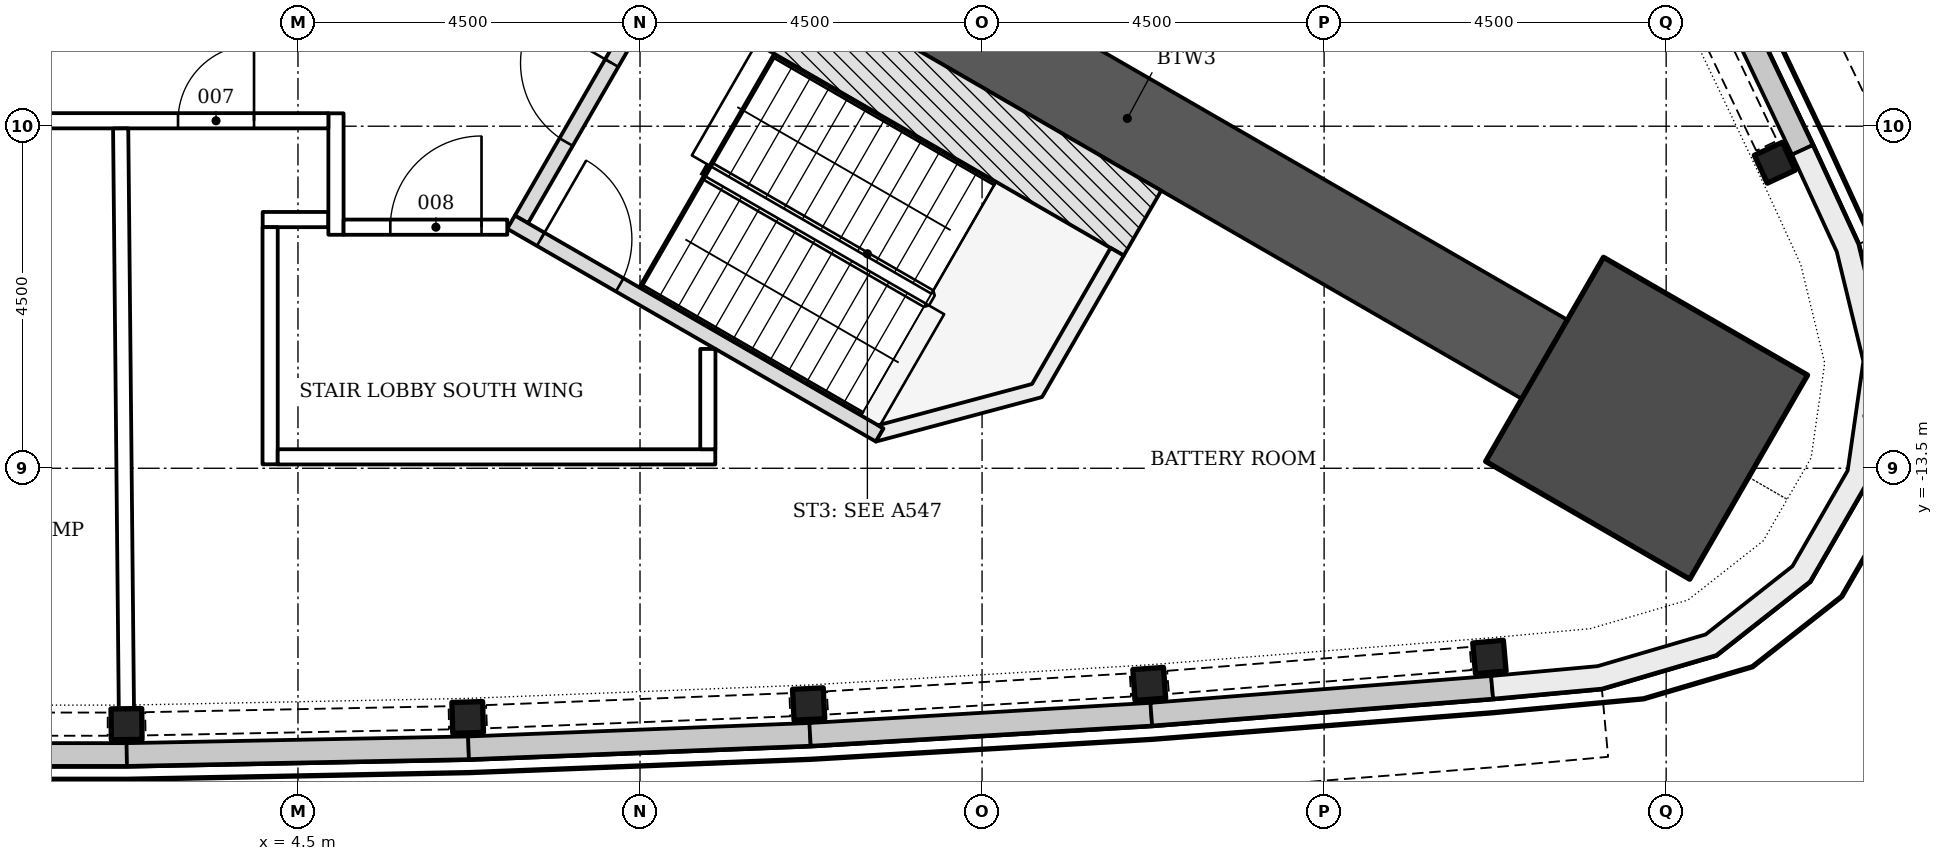
"""IFC4 building model, lengths in metres.
Left out: names, types, materials, properties, quantities, classifications, styles, units other than length and angle.
Written with IfcOpenShell. Run it as: python <this file> out.ifc"""

import sys

from ifc_helpers import new_model, si_unit, direction, frame, frame_2d, origin, origin_2d, place, context, subcontext, project, spatial, polyline, rectangle, i_section, outline, extrude, element, fill, save


model = new_model("IFC4")
c1 = context("Model", 3, precision=1e-05, world=origin(), true_north=direction((0.0, 1.0)))
c2 = subcontext(c1, "Body", "Model", "MODEL_VIEW")
j1 = project(units=[si_unit("LENGTHUNIT", "METRE"), si_unit("PLANEANGLEUNIT", "RADIAN")], contexts=[c1])
p1 = place(None, origin())
s1 = spatial("IfcSite", under=j1, at=p1, CompositionType="ELEMENT")
p2 = place(p1, origin())
s2 = spatial("IfcBuilding", under=s1, at=p2, CompositionType="ELEMENT")
p3 = place(p2, frame((0.0, 0.0, 87.0)))
s3 = spatial("IfcBuildingStorey", under=s2, at=p3, CompositionType="ELEMENT", Elevation=87.0)
p4 = place(p3, frame((9.922, -5.728, -0.3), z_axis=(0.0, 0.0, 1.0), x_axis=(0.866029086277, -0.499993621681, 0.0)))
e1 = element("IfcWall", 1, at=p4, inside=s3, PredefinedType="SHEAR", context=c2, shape_type="SweptSolid", body=[
    extrude(rectangle(XDim=12.677, YDim=1.2, at=frame_2d((6.339, 0.0))), origin(), (0.0, 0.0, 1.0), 4.6),
])
p5 = place(p3, frame((22.243, -12.842, -0.3), z_axis=(0.0, 0.0, 1.0), x_axis=(0.866025403784, -0.5, 0.0)))
e2 = element("IfcColumn", 2, at=p5, inside=s3, PredefinedType="COLUMN", context=c2, shape_type="SweptSolid", body=[
    extrude(rectangle(XDim=3.1, YDim=3.1, at=origin_2d()), origin(), (0.0, 0.0, 1.0), 4.6),
])
for number, where, z_axis, x_axis in (
    (3, (2.245, -16.866, -0.3), (0.0, 0.0, 1.0), (1.0, 0.01, 0.0)),
    (4, (6.733, -16.778, -0.3), (0.0, 0.0, 1.0), (1.0, 0.03, 0.0)),
    (5, (11.219, -16.601, -0.3), (0.0, 0.0, 1.0), (0.999, 0.049, 0.0)),
    (6, (15.7, -16.336, -0.3), (0.0, 0.0, 1.0), (0.998, 0.069, 0.0)),
    (7, (20.175, -15.983, -0.3), (0.0, 0.0, 1.0), (0.996, 0.088, 0.0)),
    (8, (23.929, -9.48, -0.3), (0.0, 0.0, 1.0), (-0.421, 0.907, 0.0)),
):
    element("IfcColumn", number, at=place(p3, frame(where, z_axis=z_axis, x_axis=x_axis)), inside=s3, PredefinedType="COLUMN", context=c2, shape_type="SweptSolid", body=[
        extrude(i_section(OverallWidth=0.404, OverallDepth=0.406, WebThickness=0.027, FlangeThickness=0.044, FilletRadius=0.015, at=origin_2d()), origin(), (0.0, 0.0, 1.0), 4.6),
    ])
p6 = place(p3, origin())
e9 = element("IfcWall", 9, at=p6, inside=s3, PredefinedType="NOTDEFINED", context=c2, shape_type="SweptSolid", body=[
    extrude(outline(polyline([(-2.25, -17.417), (2.25, -17.417), (2.25, -17.116), (-2.25, -17.116), (-2.25, -17.417)])), origin(), (0.0, 0.0, 1.0), 1.2),
])
p7 = place(p3, origin())
e10 = element("IfcWall", 10, at=p7, inside=s3, PredefinedType="NOTDEFINED", context=c2, shape_type="SweptSolid", body=[
    extrude(outline(polyline([(2.25, -17.417), (6.749, -17.328), (6.743, -17.028), (2.244, -17.116), (2.25, -17.417)])), origin(), (0.0, 0.0, 1.0), 1.2),
])
p8 = place(p3, origin())
e11 = element("IfcWall", 11, at=p8, inside=s3, PredefinedType="NOTDEFINED", context=c2, shape_type="SweptSolid", body=[
    extrude(outline(polyline([(6.749, -17.328), (11.245, -17.151), (11.234, -16.851), (6.737, -17.028), (6.749, -17.328)])), origin(), (0.0, 0.0, 1.0), 1.2),
])
p9 = place(p3, origin())
e12 = element("IfcWall", 12, at=p9, inside=s3, PredefinedType="NOTDEFINED", context=c2, shape_type="SweptSolid", body=[
    extrude(outline(polyline([(11.245, -17.151), (15.738, -16.885), (15.72, -16.586), (11.228, -16.851), (11.245, -17.151)])), origin(), (0.0, 0.0, 1.0), 1.2),
])
p10 = place(p3, origin())
e13 = element("IfcWall", 13, at=p10, inside=s3, PredefinedType="NOTDEFINED", context=c2, shape_type="SweptSolid", body=[
    extrude(outline(polyline([(15.738, -16.885), (20.224, -16.531), (20.2, -16.232), (15.714, -16.586), (15.738, -16.885)])), origin(), (0.0, 0.0, 1.0), 1.2),
])
p11 = place(p3, origin())
e14 = element("IfcWall", 14, at=p11, inside=s3, PredefinedType="NOTDEFINED", context=c2, shape_type="SweptSolid", body=[
    extrude(outline(polyline([(24.428, -9.249), (22.492, -5.187), (22.221, -5.316), (24.157, -9.378), (24.428, -9.249)])), origin(), (0.0, 0.0, 1.0), 1.2),
])
p12 = place(p3, origin())
e15 = element("IfcWall", 15, at=p12, inside=s3, PredefinedType="NOTDEFINED", context=c2, shape_type="SweptSolid", body=[
    extrude(outline(polyline([(20.224, -16.531), (21.654, -16.4), (23.159, -15.958), (24.392, -14.989), (25.177, -13.63), (25.4, -12.077), (25.03, -10.553), (24.428, -9.249), (24.156, -9.374), (24.745, -10.652), (25.094, -12.092), (24.888, -13.53), (24.161, -14.789), (23.019, -15.687), (21.597, -16.104), (20.196, -16.232), (20.224, -16.531)])), origin(), (0.0, 0.0, 1.0), 4.3),
])
p13 = place(p3, frame((7.44, -10.226, -0.3), z_axis=(0.0, 0.0, 1.0), x_axis=(0.500022077904, 0.866012656725, 0.0)))
e16 = element("IfcWall", 16, at=p13, inside=s3, PredefinedType="SHEAR", context=c2, shape_type="SweptSolid", body=[
    extrude(rectangle(XDim=3.55, YDim=0.2, at=frame_2d((1.775, 0.0))), origin(), (0.0, 0.0, 1.0), 4.6),
])
p14 = place(p13, frame((1.175, 0.0, 0.3)))
e17 = element("IfcOpeningElement", 17, at=p14, cuts=e16, PredefinedType="OPENING", context=c2, shape_type="SweptSolid", body=[
    extrude(rectangle(XDim=1.2, YDim=2.1, at=frame_2d((0.6, 1.05))), frame((0.0, 0.11, 0.0), z_axis=(0.0, -1.0, 0.0), x_axis=(1.0, 0.0, 0.0)), (0.0, 0.0, 1.0), 0.22),
])
p15 = place(p3, frame((7.304, -10.262, -0.3), z_axis=(0.0, 0.0, 1.0), x_axis=(0.866026594901, -0.49999793692, 0.0)))
e18 = element("IfcWall", 18, at=p15, inside=s3, PredefinedType="SHEAR", context=c2, shape_type="SweptSolid", body=[
    extrude(rectangle(XDim=5.6, YDim=0.2, at=frame_2d((2.8, 0.0))), origin(), (0.0, 0.0, 1.0), 4.6),
])
p16 = place(p15, frame((0.45, 0.0, 0.3)))
e19 = element("IfcOpeningElement", 19, at=p16, cuts=e18, PredefinedType="OPENING", context=c2, shape_type="SweptSolid", body=[
    extrude(rectangle(XDim=1.2, YDim=2.1, at=frame_2d((0.6, 1.05))), frame((0.0, 0.11, 0.0), z_axis=(0.0, -1.0, 0.0), x_axis=(1.0, 0.0, 0.0)), (0.0, 0.0, 1.0), 0.22),
])
p17 = place(p3, frame((9.375, -6.675, -0.3), z_axis=(0.0, 0.0, 1.0), x_axis=(0.866026919366, -0.499997374926, 0.0)))
e20 = element("IfcWall", 20, at=p17, inside=s3, PredefinedType="SHEAR", context=c2, shape_type="SweptSolid", body=[
    extrude(rectangle(XDim=7.2, YDim=0.986, at=frame_2d((3.6, 0.0))), origin(), (0.0, 0.0, 1.0), 4.6),
])
p18 = place(p3, frame((0.0, 0.0, -0.3)))
e21 = element("IfcWall", 21, at=p18, inside=s3, PredefinedType="SHEAR", context=c2, shape_type="SweptSolid", body=[
    extrude(outline(polyline([(12.104, -13.149), (14.289, -12.563), (15.364, -10.701), (15.191, -10.601), (14.157, -12.392), (12.132, -12.934), (12.204, -12.976), (12.204, -12.976), (12.204, -12.976), (12.204, -12.976), (12.204, -12.976), (12.204, -12.976), (12.204, -12.976), (12.204, -12.976), (12.204, -12.976), (12.204, -12.976), (12.204, -12.976), (12.204, -12.976), (12.204, -12.976), (12.204, -12.976), (12.204, -12.976), (12.204, -12.976), (12.204, -12.976), (12.104, -13.149)])), origin(), (0.0, 0.0, 1.0), 4.6),
])
p19 = place(p3, frame((4.036, -10.228, 0.0), z_axis=(0.0, 0.0, 1.0), x_axis=(1.0, 0.0, 0.0)))
e22 = element("IfcWall", 22, at=p19, inside=s3, PredefinedType="PARTITIONING", context=c2, shape_type="SweptSolid", body=[
    extrude(rectangle(XDim=0.864, YDim=0.2, at=frame_2d((0.432, 0.0))), origin(), (0.0, 0.0, 1.0), 4.3),
])
p20 = place(p3, frame((5.0, -10.428, 0.0), z_axis=(0.0, 0.0, 1.0), x_axis=(0.0, 1.0, 0.0)))
e23 = element("IfcWall", 23, at=p20, inside=s3, PredefinedType="PARTITIONING", context=c2, shape_type="SweptSolid", body=[
    extrude(rectangle(XDim=1.598, YDim=0.2, at=frame_2d((0.799, 0.0))), origin(), (0.0, 0.0, 1.0), 4.3),
])
p21 = place(p3, frame((5.1, -10.328, 0.0), z_axis=(0.0, 0.0, 1.0), x_axis=(1.0, 0.0, 0.0)))
e24 = element("IfcWall", 24, at=p21, inside=s3, PredefinedType="PARTITIONING", context=c2, shape_type="SweptSolid", body=[
    extrude(rectangle(XDim=2.154, YDim=0.2, at=frame_2d((1.077, 0.0))), origin(), (0.0, 0.0, 1.0), 3.678),
])
p22 = place(p21, frame((0.615, 0.0, 0.0)))
e25 = element("IfcOpeningElement", 25, at=p22, cuts=e24, PredefinedType="OPENING", context=c2, shape_type="SweptSolid", body=[
    extrude(rectangle(XDim=1.2, YDim=2.1, at=frame_2d((0.6, 1.05))), frame((0.0, 0.11, 0.0), z_axis=(0.0, -1.0, 0.0), x_axis=(1.0, 0.0, 0.0)), (0.0, 0.0, 1.0), 0.22),
])
p23 = place(p3, frame((-14.091, -8.928, 0.0), z_axis=(0.0, 0.0, 1.0), x_axis=(1.0, 0.0, 0.0)))
e26 = element("IfcWall", 26, at=p23, inside=s3, PredefinedType="PARTITIONING", context=c2, shape_type="SweptSolid", body=[
    extrude(rectangle(XDim=18.991, YDim=0.2, at=frame_2d((9.495, 0.0))), origin(), (0.0, 0.0, 1.0), 3.678),
])
p24 = place(p23, frame((3.208, 0.0, 0.0)))
e27 = element("IfcOpeningElement", 27, at=p24, cuts=e26, PredefinedType="OPENING", context=c2, shape_type="SweptSolid", body=[
    extrude(rectangle(XDim=1.0, YDim=2.1, at=frame_2d((0.5, 1.05))), frame((0.0, 0.11, 0.0), z_axis=(0.0, -1.0, 0.0), x_axis=(1.0, 0.0, 0.0)), (0.0, 0.0, 1.0), 0.22),
])
p25 = place(p23, frame((9.359, 0.0, 0.0)))
e28 = element("IfcOpeningElement", 28, at=p25, cuts=e26, PredefinedType="OPENING", context=c2, shape_type="SweptSolid", body=[
    extrude(rectangle(XDim=1.0, YDim=2.1, at=frame_2d((0.5, 1.05))), frame((0.0, 0.11, 0.0), z_axis=(0.0, -1.0, 0.0), x_axis=(1.0, 0.0, 0.0)), (0.0, 0.0, 1.0), 0.22),
])
p26 = place(p23, frame((13.49, 0.0, 0.0)))
e29 = element("IfcOpeningElement", 29, at=p26, cuts=e26, PredefinedType="OPENING", context=c2, shape_type="SweptSolid", body=[
    extrude(rectangle(XDim=1.0, YDim=2.1, at=frame_2d((0.5, 1.05))), frame((0.0, 0.11, 0.0), z_axis=(0.0, -1.0, 0.0), x_axis=(1.0, 0.0, 0.0)), (0.0, 0.0, 1.0), 0.22),
])
p27 = place(p23, frame((17.013, 0.0, 0.0)))
e30 = element("IfcOpeningElement", 30, at=p27, cuts=e26, PredefinedType="OPENING", context=c2, shape_type="SweptSolid", body=[
    extrude(rectangle(XDim=1.0, YDim=2.1, at=frame_2d((0.5, 1.05))), frame((0.0, 0.11, 0.0), z_axis=(0.0, -1.0, 0.0), x_axis=(1.0, 0.0, 0.0)), (0.0, 0.0, 1.0), 0.22),
])
p28 = place(p3, frame((2.167, -9.029, 0.0), z_axis=(0.0, 0.0, 1.0), x_axis=(0.009845168516, -0.999951535154, 0.0)))
e31 = element("IfcWall", 31, at=p28, inside=s3, PredefinedType="PARTITIONING", context=c2, shape_type="SweptSolid", body=[
    extrude(rectangle(XDim=7.688, YDim=0.2, at=frame_2d((3.844, 0.0))), origin(), (0.0, 0.0, 1.0), 3.678),
])
p29 = place(p3, frame((4.134, -10.328, 0.0), z_axis=(0.0, 0.0, 1.0), x_axis=(0.0, -1.0, 0.0)))
e32 = element("IfcWall", 32, at=p29, inside=s3, PredefinedType="PARTITIONING", context=c2, shape_type="SweptSolid", body=[
    extrude(rectangle(XDim=3.12, YDim=0.2, at=frame_2d((1.56, 0.0))), origin(), (0.0, 0.0, 1.0), 4.3),
])
p30 = place(p3, frame((4.234, -13.35, 0.0), z_axis=(0.0, 0.0, 1.0), x_axis=(1.0, 0.0, 0.0)))
e33 = element("IfcWall", 33, at=p30, inside=s3, PredefinedType="PARTITIONING", context=c2, shape_type="SweptSolid", body=[
    extrude(rectangle(XDim=5.757, YDim=0.2, at=frame_2d((2.878, 0.0))), origin(), (0.0, 0.0, 1.0), 3.678),
])
p31 = place(p3, frame((9.893, -13.25, 0.0), z_axis=(0.0, 0.0, 1.0), x_axis=(0.0, 1.0, 0.0)))
e34 = element("IfcWall", 34, at=p31, inside=s3, PredefinedType="PARTITIONING", context=c2, shape_type="SweptSolid", body=[
    extrude(rectangle(XDim=1.32, YDim=0.2, at=frame_2d((0.66, 0.0))), origin(), (0.0, 0.0, 1.0), 4.3),
])
p32 = place(p14, origin())
e35 = element("IfcDoor", 35, at=p32, inside=s3, OperationType="SINGLE_SWING_RIGHT", PredefinedType="DOOR", context=c2, shape_type="SweptSolid", body=[
    extrude(rectangle(XDim=1.2, YDim=2.1, at=frame_2d((0.6, 1.05))), frame((0.0, 0.025, 0.0), z_axis=(0.0, -1.0, 0.0), x_axis=(1.0, 0.0, 0.0)), (0.0, 0.0, 1.0), 0.05),
])
fill(e17, e35)
p33 = place(p16, origin())
e36 = element("IfcDoor", 36, at=p33, inside=s3, OperationType="SINGLE_SWING_LEFT", PredefinedType="DOOR", context=c2, shape_type="SweptSolid", body=[
    extrude(rectangle(XDim=1.2, YDim=2.1, at=frame_2d((0.6, 1.05))), frame((0.0, 0.025, 0.0), z_axis=(0.0, -1.0, 0.0), x_axis=(1.0, 0.0, 0.0)), (0.0, 0.0, 1.0), 0.05),
])
fill(e19, e36)
p34 = place(p27, origin())
e37 = element("IfcDoor", 37, at=p34, inside=s3, OperationType="SINGLE_SWING_RIGHT", PredefinedType="DOOR", context=c2, shape_type="SweptSolid", body=[
    extrude(rectangle(XDim=1.0, YDim=2.1, at=frame_2d((0.5, 1.05))), frame((0.0, 0.025, 0.0), z_axis=(0.0, -1.0, 0.0), x_axis=(1.0, 0.0, 0.0)), (0.0, 0.0, 1.0), 0.05),
])
fill(e30, e37)
p35 = place(p22, origin())
e38 = element("IfcDoor", 38, at=p35, inside=s3, OperationType="SINGLE_SWING_RIGHT", PredefinedType="DOOR", context=c2, shape_type="SweptSolid", body=[
    extrude(rectangle(XDim=1.2, YDim=2.1, at=frame_2d((0.6, 1.05))), frame((0.0, 0.025, 0.0), z_axis=(0.0, -1.0, 0.0), x_axis=(1.0, 0.0, 0.0)), (0.0, 0.0, 1.0), 0.05),
])
fill(e25, e38)
save(model, sys.argv[1])
